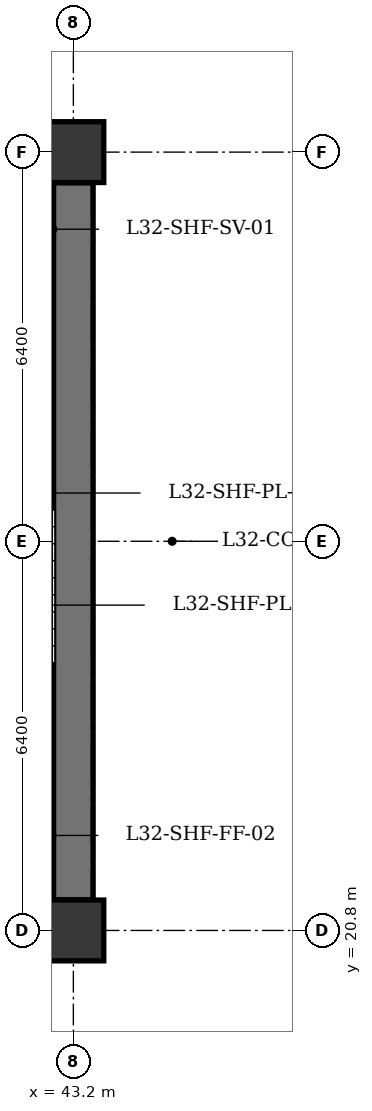
"""IFC4 building model, lengths in metres.
Left out: names, types, materials, properties, quantities, classifications, styles, units other than length and angle.
Written with IfcOpenShell. Run it as: python <this file> out.ifc"""

import sys

from ifc_helpers import new_model, si_unit, direction, frame, frame_2d, origin, origin_2d, place, context, subcontext, project, spatial, rectangle, extrude, element, save


model = new_model("IFC4")
c1 = context("Model", 3, precision=1e-05, world=origin(), true_north=direction((0.0, 1.0)))
c2 = subcontext(c1, "Body", "Model", "MODEL_VIEW")
j1 = project(units=[si_unit("LENGTHUNIT", "METRE"), si_unit("PLANEANGLEUNIT", "RADIAN")], contexts=[c1])
p1 = place(None, origin())
s1 = spatial("IfcSite", under=j1, at=p1, CompositionType="ELEMENT")
p2 = place(p1, origin())
s2 = spatial("IfcBuilding", under=s1, at=p2, CompositionType="ELEMENT")
p3 = place(p2, frame((0.0, 0.0, 130.8)))
s3 = spatial("IfcBuildingStorey", under=s2, at=p3, CompositionType="ELEMENT", Elevation=130.8)
for number, where, z_axis, x_axis in (
    (1, (43.2, 20.8, 0.0), (0.0, 0.0, 1.0), (1.0, 0.0, 0.0)),
    (2, (43.2, 33.6, 0.0), (0.0, 0.0, 1.0), (1.0, 0.0, 0.0)),
):
    element("IfcColumn", number, at=place(p3, frame(where, z_axis=z_axis, x_axis=x_axis)), inside=s3, PredefinedType="COLUMN", context=c2, shape_type="SweptSolid", body=[
        extrude(rectangle(XDim=1.0, YDim=1.0, at=origin_2d()), origin(), (0.0, 0.0, 1.0), 3.5),
    ])
p4 = place(p3, frame((43.2, 21.305, 0.0), z_axis=(0.0, 0.0, 1.0), x_axis=(0.0, 1.0, 0.0)))
e3 = element("IfcWall", 3, at=p4, inside=s3, PredefinedType="SHEAR", context=c2, shape_type="SweptSolid", body=[
    extrude(rectangle(XDim=11.79, YDim=0.65, at=frame_2d((5.895, 0.0))), origin(), (0.0, 0.0, 1.0), 3.2),
])
for number, where, z_axis, x_axis in (
    (4, (39.69, 23.57, 0.0), (0.0, 0.0, 1.0), (1.0, 0.0, 0.0)),
    (5, (39.69, 30.83, 0.0), (0.0, 0.0, 1.0), (1.0, 0.0, 0.0)),
):
    element("IfcWall", number, at=place(p3, frame(where, z_axis=z_axis, x_axis=x_axis)), inside=s3, PredefinedType="SHEAR", context=c2, shape_type="SweptSolid", body=[
        extrude(rectangle(XDim=3.175, YDim=0.25, at=frame_2d((1.587, 0.0))), origin(), (0.0, 0.0, 1.0), 3.2),
    ])
save(model, sys.argv[1])
